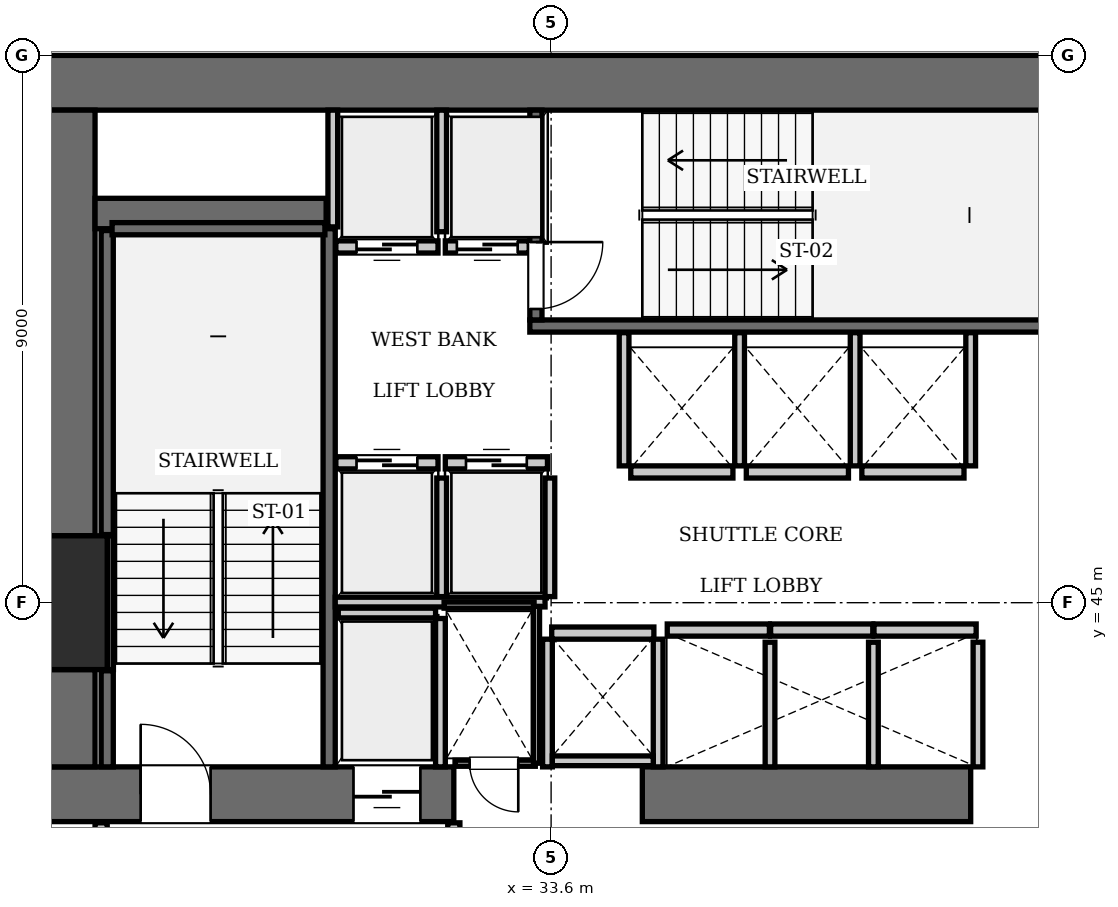
"""IFC4 building model, lengths in metres.
Left out: names, types, materials, properties, quantities, classifications, styles, units other than length and angle.
Written with IfcOpenShell. Run it as: python <this file> out.ifc"""

import sys

from ifc_helpers import new_model, si_unit, direction, frame, frame_2d, origin, origin_2d, place, context, subcontext, project, spatial, rectangle, extrude, element, fill, save


model = new_model("IFC4")
c1 = context("Model", 3, precision=1e-05, world=origin(), true_north=direction((0.0, 1.0)))
c2 = subcontext(c1, "Body", "Model", "MODEL_VIEW")
j1 = project(units=[si_unit("LENGTHUNIT", "METRE"), si_unit("PLANEANGLEUNIT", "RADIAN")], contexts=[c1])
p1 = place(None, origin())
s1 = spatial("IfcSite", under=j1, at=p1, CompositionType="ELEMENT")
p2 = place(p1, origin())
s2 = spatial("IfcBuilding", under=s1, at=p2, CompositionType="ELEMENT")
p3 = place(p2, frame((0.0, 0.0, 92.4)))
s3 = spatial("IfcBuildingStorey", under=s2, at=p3, CompositionType="ELEMENT", Elevation=92.4)
p4 = place(p3, frame((25.2, 45.0, 0.0), z_axis=(0.0, 0.0, 1.0), x_axis=(1.0, 0.0, 0.0)))
e1 = element("IfcColumn", 1, at=p4, inside=s3, PredefinedType="COLUMN", context=c2, shape_type="SweptSolid", body=[
    extrude(rectangle(XDim=2.2, YDim=2.2, at=origin_2d()), origin(), (0.0, 0.0, 1.0), 3.85),
])
p5 = place(p3, frame((25.2, 53.55, 0.0), z_axis=(0.0, 0.0, 1.0), x_axis=(1.0, 0.0, 0.0)))
e2 = element("IfcWall", 2, at=p5, inside=s3, PredefinedType="SHEAR", context=c2, shape_type="SweptSolid", body=[
    extrude(rectangle(XDim=25.2, YDim=0.9, at=frame_2d((12.6, 0.0))), origin(), (0.0, 0.0, 1.0), 3.85),
])
p6 = place(p3, frame((25.2, 41.85, 0.0), z_axis=(0.0, 0.0, 1.0), x_axis=(1.0, 0.0, 0.0)))
e3 = element("IfcWall", 3, at=p6, inside=s3, PredefinedType="SHEAR", context=c2, shape_type="SweptSolid", body=[
    extrude(rectangle(XDim=6.8, YDim=0.9, at=frame_2d((3.4, 0.0))), origin(), (0.0, 0.0, 1.0), 3.85),
])
p7 = place(p6, frame((1.65, 0.0, 0.0)))
e4 = element("IfcOpeningElement", 4, at=p7, cuts=e3, PredefinedType="OPENING", context=c2, shape_type="SweptSolid", body=[
    extrude(rectangle(XDim=1.15, YDim=2.15, at=frame_2d((0.575, 1.075))), frame((0.0, 0.46, 0.0), z_axis=(0.0, -1.0, 0.0), x_axis=(1.0, 0.0, 0.0)), (0.0, 0.0, 1.0), 0.92),
])
p8 = place(p6, frame((5.15, 0.0, 0.0)))
e5 = element("IfcOpeningElement", 5, at=p8, cuts=e3, PredefinedType="OPENING", context=c2, shape_type="SweptSolid", body=[
    extrude(rectangle(XDim=1.1, YDim=2.2, at=frame_2d((0.55, 1.1))), frame((0.0, 0.46, 0.0), z_axis=(0.0, -1.0, 0.0), x_axis=(1.0, 0.0, 0.0)), (0.0, 0.0, 1.0), 0.92),
])
p9 = place(p3, frame((35.1, 41.85, 0.0), z_axis=(0.0, 0.0, 1.0), x_axis=(1.0, 0.0, 0.0)))
e6 = element("IfcWall", 6, at=p9, inside=s3, PredefinedType="SHEAR", context=c2, shape_type="SweptSolid", body=[
    extrude(rectangle(XDim=5.4, YDim=0.9, at=frame_2d((2.7, 0.0))), origin(), (0.0, 0.0, 1.0), 3.85),
])
p10 = place(p3, frame((25.65, 42.3, 0.0), z_axis=(0.0, 0.0, 1.0), x_axis=(0.0, 1.0, 0.0)))
e7 = element("IfcWall", 7, at=p10, inside=s3, PredefinedType="SHEAR", context=c2, shape_type="SweptSolid", body=[
    extrude(rectangle(XDim=1.6, YDim=0.9, at=frame_2d((0.8, 0.0))), origin(), (0.0, 0.0, 1.0), 3.85),
])
p11 = place(p3, frame((25.65, 46.1, 0.0), z_axis=(0.0, 0.0, 1.0), x_axis=(0.0, 1.0, 0.0)))
e8 = element("IfcWall", 8, at=p11, inside=s3, PredefinedType="SHEAR", context=c2, shape_type="SweptSolid", body=[
    extrude(rectangle(XDim=7.0, YDim=0.9, at=frame_2d((3.5, 0.0))), origin(), (0.0, 0.0, 1.0), 3.85),
])
p12 = place(p3, frame((26.1, 51.4, 0.0), z_axis=(0.0, 0.0, 1.0), x_axis=(1.0, 0.0, 0.0)))
e9 = element("IfcWall", 9, at=p12, inside=s3, PredefinedType="SHEAR", context=c2, shape_type="SweptSolid", body=[
    extrude(rectangle(XDim=3.8, YDim=0.5, at=frame_2d((1.9, 0.0))), origin(), (0.0, 0.0, 1.0), 3.85),
])
p13 = place(p3, frame((29.95, 42.3, 0.0), z_axis=(0.0, 0.0, 1.0), x_axis=(0.0, 1.0, 0.0)))
e10 = element("IfcWall", 10, at=p13, inside=s3, PredefinedType="SOLIDWALL", context=c2, shape_type="SweptSolid", body=[
    extrude(rectangle(XDim=8.85, YDim=0.2, at=frame_2d((4.425, 0.0))), origin(), (0.0, 0.0, 1.0), 3.61),
])
p14 = place(p3, frame((26.3, 42.3, 0.0), z_axis=(0.0, 0.0, 1.0), x_axis=(0.0, 1.0, 0.0)))
e11 = element("IfcWall", 11, at=p14, inside=s3, PredefinedType="SOLIDWALL", context=c2, shape_type="SweptSolid", body=[
    extrude(rectangle(XDim=1.58, YDim=0.2, at=frame_2d((0.79, 0.0))), origin(), (0.0, 0.0, 1.0), 3.61),
])
p15 = place(p3, frame((26.3, 46.12, 0.0), z_axis=(0.0, 0.0, 1.0), x_axis=(0.0, 1.0, 0.0)))
e12 = element("IfcWall", 12, at=p15, inside=s3, PredefinedType="SOLIDWALL", context=c2, shape_type="SweptSolid", body=[
    extrude(rectangle(XDim=5.0, YDim=0.2, at=frame_2d((2.5, 0.0))), origin(), (0.0, 0.0, 1.0), 3.61),
])
p16 = place(p3, frame((26.38, 51.15, 0.0), z_axis=(0.0, 0.0, 1.0), x_axis=(1.0, 0.0, 0.0)))
e13 = element("IfcWall", 13, at=p16, inside=s3, PredefinedType="SOLIDWALL", context=c2, shape_type="SweptSolid", body=[
    extrude(rectangle(XDim=3.5, YDim=0.2, at=frame_2d((1.75, 0.0))), origin(), (0.0, 0.0, 1.0), 3.61),
])
p17 = place(p3, frame((26.352, 43.9, 0.0), z_axis=(0.0, 0.0, 1.0), x_axis=(0.0, 1.0, 0.0)))
e14 = element("IfcWall", 14, at=p17, inside=s3, PredefinedType="SOLIDWALL", context=c2, shape_type="SweptSolid", body=[
    extrude(rectangle(XDim=2.2, YDim=0.1, at=frame_2d((1.1, 0.0))), origin(), (0.0, 0.0, 1.0), 3.61),
])
p18 = place(p3, frame((33.25, 49.55, 0.0), z_axis=(0.0, 0.0, 1.0), x_axis=(1.0, 0.0, 0.0)))
e15 = element("IfcWall", 15, at=p18, inside=s3, PredefinedType="SOLIDWALL", context=c2, shape_type="SweptSolid", body=[
    extrude(rectangle(XDim=9.1, YDim=0.2, at=frame_2d((4.55, 0.0))), origin(), (0.0, 0.0, 1.0), 3.61),
])
p19 = place(p3, frame((33.35, 49.65, 0.0), z_axis=(0.0, 0.0, 1.0), x_axis=(0.0, 1.0, 0.0)))
e16 = element("IfcWall", 16, at=p19, inside=s3, PredefinedType="SOLIDWALL", context=c2, shape_type="SweptSolid", body=[
    extrude(rectangle(XDim=3.45, YDim=0.2, at=frame_2d((1.725, 0.0))), origin(), (0.0, 0.0, 1.0), 3.61),
])
p20 = place(p19, frame((0.18, 0.0, 0.0)))
e17 = element("IfcOpeningElement", 17, at=p20, cuts=e16, PredefinedType="OPENING", context=c2, shape_type="SweptSolid", body=[
    extrude(rectangle(XDim=1.1, YDim=2.15, at=frame_2d((0.55, 1.075))), frame((0.0, 0.11, 0.0), z_axis=(0.0, -1.0, 0.0), x_axis=(1.0, 0.0, 0.0)), (0.0, 0.0, 1.0), 0.22),
])
p21 = place(p3, frame((30.06, 47.3, 0.0), z_axis=(0.0, 0.0, 1.0), x_axis=(1.0, 0.0, 0.0)))
e18 = element("IfcWall", 18, at=p21, inside=s3, PredefinedType="SOLIDWALL", context=c2, shape_type="SweptSolid", body=[
    extrude(rectangle(XDim=1.68, YDim=0.2, at=frame_2d((0.84, 0.0))), origin(), (0.0, 0.0, 1.0), 3.61),
])
p22 = place(p21, frame((0.34, 0.0, 0.0)))
e19 = element("IfcOpeningElement", 19, at=p22, cuts=e18, PredefinedType="OPENING", context=c2, shape_type="SweptSolid", body=[
    extrude(rectangle(XDim=1.0, YDim=2.15, at=frame_2d((0.5, 1.075))), frame((0.0, 0.11, 0.0), z_axis=(0.0, -1.0, 0.0), x_axis=(1.0, 0.0, 0.0)), (0.0, 0.0, 1.0), 0.22),
])
p23 = place(p3, frame((31.86, 47.3, 0.0), z_axis=(0.0, 0.0, 1.0), x_axis=(1.0, 0.0, 0.0)))
e20 = element("IfcWall", 20, at=p23, inside=s3, PredefinedType="SOLIDWALL", context=c2, shape_type="SweptSolid", body=[
    extrude(rectangle(XDim=1.68, YDim=0.2, at=frame_2d((0.84, 0.0))), origin(), (0.0, 0.0, 1.0), 3.61),
])
p24 = place(p23, frame((0.34, 0.0, 0.0)))
e21 = element("IfcOpeningElement", 21, at=p24, cuts=e20, PredefinedType="OPENING", context=c2, shape_type="SweptSolid", body=[
    extrude(rectangle(XDim=1.0, YDim=2.15, at=frame_2d((0.5, 1.075))), frame((0.0, 0.11, 0.0), z_axis=(0.0, -1.0, 0.0), x_axis=(1.0, 0.0, 0.0)), (0.0, 0.0, 1.0), 0.22),
])
p25 = place(p3, frame((30.06, 50.85, 0.0), z_axis=(0.0, 0.0, 1.0), x_axis=(1.0, 0.0, 0.0)))
e22 = element("IfcWall", 22, at=p25, inside=s3, PredefinedType="SOLIDWALL", context=c2, shape_type="SweptSolid", body=[
    extrude(rectangle(XDim=1.68, YDim=0.2, at=frame_2d((0.84, 0.0))), origin(), (0.0, 0.0, 1.0), 3.61),
])
p26 = place(p25, frame((0.34, 0.0, 0.0)))
e23 = element("IfcOpeningElement", 23, at=p26, cuts=e22, PredefinedType="OPENING", context=c2, shape_type="SweptSolid", body=[
    extrude(rectangle(XDim=1.0, YDim=2.15, at=frame_2d((0.5, 1.075))), frame((0.0, 0.11, 0.0), z_axis=(0.0, -1.0, 0.0), x_axis=(1.0, 0.0, 0.0)), (0.0, 0.0, 1.0), 0.22),
])
p27 = place(p3, frame((31.86, 50.85, 0.0), z_axis=(0.0, 0.0, 1.0), x_axis=(1.0, 0.0, 0.0)))
e24 = element("IfcWall", 24, at=p27, inside=s3, PredefinedType="SOLIDWALL", context=c2, shape_type="SweptSolid", body=[
    extrude(rectangle(XDim=1.38, YDim=0.2, at=frame_2d((0.69, 0.0))), origin(), (0.0, 0.0, 1.0), 3.61),
])
p28 = place(p27, frame((0.19, 0.0, 0.0)))
e25 = element("IfcOpeningElement", 25, at=p28, cuts=e24, PredefinedType="OPENING", context=c2, shape_type="SweptSolid", body=[
    extrude(rectangle(XDim=1.0, YDim=2.15, at=frame_2d((0.5, 1.075))), frame((0.0, 0.11, 0.0), z_axis=(0.0, -1.0, 0.0), x_axis=(1.0, 0.0, 0.0)), (0.0, 0.0, 1.0), 0.22),
])
for number, where, z_axis, x_axis in (
    (26, (35.51, 44.55, 0.0), (0.0, 0.0, 1.0), (1.0, 0.0, 0.0)),
    (27, (37.21, 44.55, 0.0), (0.0, 0.0, 1.0), (1.0, 0.0, 0.0)),
):
    element("IfcWall", number, at=place(p3, frame(where, z_axis=z_axis, x_axis=x_axis)), inside=s3, PredefinedType="SOLIDWALL", context=c2, shape_type="SweptSolid", body=[
        extrude(rectangle(XDim=1.68, YDim=0.2, at=frame_2d((0.84, 0.0))), origin(), (0.0, 0.0, 1.0), 3.61),
    ])
for number, where, z_axis, x_axis in (
    (28, (38.91, 44.55, 0.0), (0.0, 0.0, 1.0), (1.0, 0.0, 0.0)),
    (29, (34.91, 47.15, 0.0), (0.0, 0.0, 1.0), (1.0, 0.0, 0.0)),
):
    element("IfcWall", number, at=place(p3, frame(where, z_axis=z_axis, x_axis=x_axis)), inside=s3, PredefinedType="SOLIDWALL", context=c2, shape_type="SweptSolid", body=[
        extrude(rectangle(XDim=1.68, YDim=0.2, at=frame_2d((0.84, 0.0))), origin(), (0.0, 0.0, 1.0), 3.61),
    ])
for number, where, z_axis, x_axis in (
    (30, (36.81, 47.15, 0.0), (0.0, 0.0, 1.0), (1.0, 0.0, 0.0)),
    (31, (38.71, 47.15, 0.0), (0.0, 0.0, 1.0), (1.0, 0.0, 0.0)),
    (32, (33.61, 44.5, 0.0), (0.0, 0.0, 1.0), (1.0, 0.0, 0.0)),
):
    element("IfcWall", number, at=place(p3, frame(where, z_axis=z_axis, x_axis=x_axis)), inside=s3, PredefinedType="SOLIDWALL", context=c2, shape_type="SweptSolid", body=[
        extrude(rectangle(XDim=1.68, YDim=0.2, at=frame_2d((0.84, 0.0))), origin(), (0.0, 0.0, 1.0), 3.61),
    ])
p29 = place(p3, frame((30.1, 44.83, 0.0), z_axis=(0.0, 0.0, 1.0), x_axis=(1.0, 0.0, 0.0)))
e33 = element("IfcWall", 33, at=p29, inside=s3, PredefinedType="SOLIDWALL", context=c2, shape_type="SweptSolid", body=[
    extrude(rectangle(XDim=1.6, YDim=0.16, at=frame_2d((0.8, 0.0))), origin(), (0.0, 0.0, 1.0), 3.61),
])
p30 = place(p3, frame((31.78, 42.3, 0.0), z_axis=(0.0, 0.0, 1.0), x_axis=(0.0, 1.0, 0.0)))
e34 = element("IfcWall", 34, at=p30, inside=s3, PredefinedType="SOLIDWALL", context=c2, shape_type="SweptSolid", body=[
    extrude(rectangle(XDim=2.44, YDim=0.16, at=frame_2d((1.22, 0.0))), origin(), (0.0, 0.0, 1.0), 3.61),
])
for number, where, z_axis, x_axis in (
    (35, (31.8, 45.1, 0.0), (0.0, 0.0, 1.0), (0.0, 1.0, 0.0)),
    (36, (33.58, 45.1, 0.0), (0.0, 0.0, 1.0), (0.0, 1.0, 0.0)),
):
    element("IfcWall", number, at=place(p3, frame(where, z_axis=z_axis, x_axis=x_axis)), inside=s3, PredefinedType="SOLIDWALL", context=c2, shape_type="SweptSolid", body=[
        extrude(rectangle(XDim=1.95, YDim=0.16, at=frame_2d((0.975, 0.0))), origin(), (0.0, 0.0, 1.0), 3.61),
    ])
p31 = place(p3, frame((30.05, 45.01, 0.0), z_axis=(0.0, 0.0, 1.0), x_axis=(1.0, 0.0, 0.0)))
e37 = element("IfcWall", 37, at=p31, inside=s3, PredefinedType="SOLIDWALL", context=c2, shape_type="SweptSolid", body=[
    extrude(rectangle(XDim=3.45, YDim=0.16, at=frame_2d((1.725, 0.0))), origin(), (0.0, 0.0, 1.0), 3.61),
])
p32 = place(p3, frame((30.01, 51.18, 0.0), z_axis=(0.0, 0.0, 1.0), x_axis=(0.0, 1.0, 0.0)))
e38 = element("IfcWall", 38, at=p32, inside=s3, PredefinedType="SOLIDWALL", context=c2, shape_type="SweptSolid", body=[
    extrude(rectangle(XDim=1.92, YDim=0.16, at=frame_2d((0.96, 0.0))), origin(), (0.0, 0.0, 1.0), 3.61),
])
p33 = place(p3, frame((31.8, 51.1, 0.0), z_axis=(0.0, 0.0, 1.0), x_axis=(0.0, 1.0, 0.0)))
e39 = element("IfcWall", 39, at=p33, inside=s3, PredefinedType="SOLIDWALL", context=c2, shape_type="SweptSolid", body=[
    extrude(rectangle(XDim=2.0, YDim=0.16, at=frame_2d((1.0, 0.0))), origin(), (0.0, 0.0, 1.0), 3.61),
])
for number, where, z_axis, x_axis in (
    (40, (37.2, 42.3, 0.0), (0.0, 0.0, 1.0), (0.0, 1.0, 0.0)),
    (41, (38.9, 42.3, 0.0), (0.0, 0.0, 1.0), (0.0, 1.0, 0.0)),
    (42, (40.62, 42.3, 0.0), (0.0, 0.0, 1.0), (0.0, 1.0, 0.0)),
):
    element("IfcWall", number, at=place(p3, frame(where, z_axis=z_axis, x_axis=x_axis)), inside=s3, PredefinedType="SOLIDWALL", context=c2, shape_type="SweptSolid", body=[
        extrude(rectangle(XDim=2.05, YDim=0.16, at=frame_2d((1.025, 0.0))), origin(), (0.0, 0.0, 1.0), 3.61),
    ])
for number, where, z_axis, x_axis in (
    (43, (34.8, 47.25, 0.0), (0.0, 0.0, 1.0), (0.0, 1.0, 0.0)),
    (44, (36.7, 47.25, 0.0), (0.0, 0.0, 1.0), (0.0, 1.0, 0.0)),
    (45, (38.6, 47.25, 0.0), (0.0, 0.0, 1.0), (0.0, 1.0, 0.0)),
    (46, (40.5, 47.25, 0.0), (0.0, 0.0, 1.0), (0.0, 1.0, 0.0)),
):
    element("IfcWall", number, at=place(p3, frame(where, z_axis=z_axis, x_axis=x_axis)), inside=s3, PredefinedType="SOLIDWALL", context=c2, shape_type="SweptSolid", body=[
        extrude(rectangle(XDim=2.19, YDim=0.16, at=frame_2d((1.095, 0.0))), origin(), (0.0, 0.0, 1.0), 3.61),
    ])
for number, where, z_axis, x_axis in (
    (47, (33.54, 42.3, 0.0), (0.0, 0.0, 1.0), (0.0, 1.0, 0.0)),
    (48, (35.36, 42.3, 0.0), (0.0, 0.0, 1.0), (0.0, 1.0, 0.0)),
):
    element("IfcWall", number, at=place(p3, frame(where, z_axis=z_axis, x_axis=x_axis)), inside=s3, PredefinedType="SOLIDWALL", context=c2, shape_type="SweptSolid", body=[
        extrude(rectangle(XDim=2.1, YDim=0.16, at=frame_2d((1.05, 0.0))), origin(), (0.0, 0.0, 1.0), 3.61),
    ])
p34 = place(p3, frame((33.62, 42.4, 0.0), z_axis=(0.0, 0.0, 1.0), x_axis=(1.0, 0.0, 0.0)))
e49 = element("IfcWall", 49, at=p34, inside=s3, PredefinedType="SOLIDWALL", context=c2, shape_type="SweptSolid", body=[
    extrude(rectangle(XDim=1.66, YDim=0.16, at=frame_2d((0.83, 0.0))), origin(), (0.0, 0.0, 1.0), 3.61),
])
for number, where, z_axis, x_axis in (
    (50, (26.2, 38.31, 0.0), (0.0, 0.0, 1.0), (0.0, 1.0, 0.0)),
    (51, (32.0, 38.31, 0.0), (0.0, 0.0, 1.0), (0.0, 1.0, 0.0)),
):
    element("IfcWall", number, at=place(p3, frame(where, z_axis=z_axis, x_axis=x_axis)), inside=s3, PredefinedType="PARTITIONING", context=c2, shape_type="SweptSolid", body=[
        extrude(rectangle(XDim=3.07, YDim=0.2, at=frame_2d((1.535, 0.0))), origin(), (0.0, 0.0, 1.0), 3.61),
    ])
p35 = place(p3, frame((32.02, 42.36, 0.0), z_axis=(0.0, 0.0, 1.0), x_axis=(1.0, 0.0, 0.0)))
e52 = element("IfcWall", 52, at=p35, inside=s3, PredefinedType="PARTITIONING", context=c2, shape_type="SweptSolid", body=[
    extrude(rectangle(XDim=1.32, YDim=0.1, at=frame_2d((0.66, 0.0))), origin(), (0.0, 0.0, 1.0), 3.61),
])
p36 = place(p35, frame((0.24, 0.0, 0.0)))
e53 = element("IfcOpeningElement", 53, at=p36, cuts=e52, PredefinedType="OPENING", context=c2, shape_type="SweptSolid", body=[
    extrude(rectangle(XDim=0.8, YDim=2.05, at=frame_2d((0.4, 1.025))), frame((0.0, 0.06, 0.0), z_axis=(0.0, -1.0, 0.0), x_axis=(1.0, 0.0, 0.0)), (0.0, 0.0, 1.0), 0.12),
])
p37 = place(p3, frame((31.84, 44.96, 0.0), z_axis=(0.0, 0.0, 1.0), x_axis=(1.0, 0.0, 0.0)))
e54 = element("IfcWall", 54, at=p37, inside=s3, PredefinedType="PARTITIONING", context=c2, shape_type="SweptSolid", body=[
    extrude(rectangle(XDim=1.48, YDim=0.1, at=frame_2d((0.74, 0.0))), origin(), (0.0, 0.0, 1.0), 3.61),
])
p38 = place(p3, frame((33.36, 42.36, 0.0), z_axis=(0.0, 0.0, 1.0), x_axis=(0.0, 1.0, 0.0)))
e55 = element("IfcWall", 55, at=p38, inside=s3, PredefinedType="PARTITIONING", context=c2, shape_type="SweptSolid", body=[
    extrude(rectangle(XDim=2.58, YDim=0.1, at=frame_2d((1.29, 0.0))), origin(), (0.0, 0.0, 1.0), 3.61),
])
p39 = place(p7, origin())
e56 = element("IfcDoor", 56, at=p39, inside=s3, OperationType="SINGLE_SWING_LEFT", PredefinedType="DOOR", context=c2, shape_type="SweptSolid", body=[
    extrude(rectangle(XDim=1.15, YDim=2.15, at=frame_2d((0.575, 1.075))), frame((0.0, 0.025, 0.0), z_axis=(0.0, -1.0, 0.0), x_axis=(1.0, 0.0, 0.0)), (0.0, 0.0, 1.0), 0.05),
])
fill(e4, e56)
p40 = place(p20, frame((1.1, 0.0, 0.0), z_axis=(0.0, 0.0, 1.0), x_axis=(-1.0, 0.0, 0.0)))
e57 = element("IfcDoor", 57, at=p40, inside=s3, OperationType="SINGLE_SWING_LEFT", PredefinedType="DOOR", context=c2, shape_type="SweptSolid", body=[
    extrude(rectangle(XDim=1.1, YDim=2.15, at=frame_2d((0.55, 1.075))), frame((0.0, 0.025, 0.0), z_axis=(0.0, -1.0, 0.0), x_axis=(1.0, 0.0, 0.0)), (0.0, 0.0, 1.0), 0.05),
])
fill(e17, e57)
p41 = place(p22, origin())
e58 = element("IfcDoor", 58, at=p41, inside=s3, OperationType="SLIDING_TO_LEFT", PredefinedType="DOOR", context=c2, shape_type="SweptSolid", body=[
    extrude(rectangle(XDim=1.0, YDim=2.15, at=frame_2d((0.5, 1.075))), frame((0.0, 0.025, 0.0), z_axis=(0.0, -1.0, 0.0), x_axis=(1.0, 0.0, 0.0)), (0.0, 0.0, 1.0), 0.05),
])
fill(e19, e58)
p42 = place(p24, origin())
e59 = element("IfcDoor", 59, at=p42, inside=s3, OperationType="SLIDING_TO_LEFT", PredefinedType="DOOR", context=c2, shape_type="SweptSolid", body=[
    extrude(rectangle(XDim=1.0, YDim=2.15, at=frame_2d((0.5, 1.075))), frame((0.0, 0.025, 0.0), z_axis=(0.0, -1.0, 0.0), x_axis=(1.0, 0.0, 0.0)), (0.0, 0.0, 1.0), 0.05),
])
fill(e21, e59)
p43 = place(p26, frame((1.0, 0.0, 0.0), z_axis=(0.0, 0.0, 1.0), x_axis=(-1.0, 0.0, 0.0)))
e60 = element("IfcDoor", 60, at=p43, inside=s3, OperationType="SLIDING_TO_LEFT", PredefinedType="DOOR", context=c2, shape_type="SweptSolid", body=[
    extrude(rectangle(XDim=1.0, YDim=2.15, at=frame_2d((0.5, 1.075))), frame((0.0, 0.025, 0.0), z_axis=(0.0, -1.0, 0.0), x_axis=(1.0, 0.0, 0.0)), (0.0, 0.0, 1.0), 0.05),
])
fill(e23, e60)
p44 = place(p28, frame((1.0, 0.0, 0.0), z_axis=(0.0, 0.0, 1.0), x_axis=(-1.0, 0.0, 0.0)))
e61 = element("IfcDoor", 61, at=p44, inside=s3, OperationType="SLIDING_TO_LEFT", PredefinedType="DOOR", context=c2, shape_type="SweptSolid", body=[
    extrude(rectangle(XDim=1.0, YDim=2.15, at=frame_2d((0.5, 1.075))), frame((0.0, 0.025, 0.0), z_axis=(0.0, -1.0, 0.0), x_axis=(1.0, 0.0, 0.0)), (0.0, 0.0, 1.0), 0.05),
])
fill(e25, e61)
p45 = place(p8, frame((1.1, 0.0, 0.0), z_axis=(0.0, 0.0, 1.0), x_axis=(-1.0, 0.0, 0.0)))
e62 = element("IfcDoor", 62, at=p45, inside=s3, OperationType="SLIDING_TO_LEFT", PredefinedType="DOOR", context=c2, shape_type="SweptSolid", body=[
    extrude(rectangle(XDim=1.1, YDim=2.2, at=frame_2d((0.55, 1.1))), frame((0.0, 0.025, 0.0), z_axis=(0.0, -1.0, 0.0), x_axis=(1.0, 0.0, 0.0)), (0.0, 0.0, 1.0), 0.05),
])
fill(e5, e62)
p46 = place(p36, frame((0.8, 0.0, 0.0), z_axis=(0.0, 0.0, 1.0), x_axis=(-1.0, 0.0, 0.0)))
e63 = element("IfcDoor", 63, at=p46, inside=s3, OperationType="SINGLE_SWING_LEFT", PredefinedType="DOOR", context=c2, shape_type="SweptSolid", body=[
    extrude(rectangle(XDim=0.8, YDim=2.05, at=frame_2d((0.4, 1.025))), frame((0.0, 0.025, 0.0), z_axis=(0.0, -1.0, 0.0), x_axis=(1.0, 0.0, 0.0)), (0.0, 0.0, 1.0), 0.05),
])
fill(e53, e63)
save(model, sys.argv[1])
